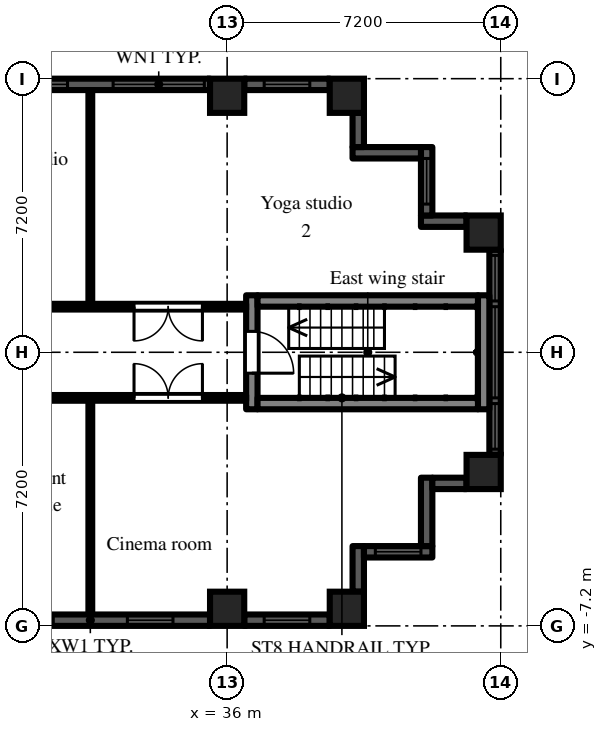
"""IFC4 building model, lengths in metres.
Left out: names, types, materials, properties, quantities, classifications, styles, units other than length and angle.
Written with IfcOpenShell. Run it as: python <this file> out.ifc"""

import sys

from ifc_helpers import new_model, si_unit, direction, frame, frame_2d, origin, origin_2d, place, context, subcontext, project, spatial, rectangle, extrude, element, fill, save


model = new_model("IFC4")
c1 = context("Model", 3, precision=1e-05, world=origin(), true_north=direction((0.0, 1.0)))
c2 = subcontext(c1, "Body", "Model", "MODEL_VIEW")
j1 = project(units=[si_unit("LENGTHUNIT", "METRE"), si_unit("PLANEANGLEUNIT", "RADIAN")], contexts=[c1])
p1 = place(None, origin())
s1 = spatial("IfcSite", under=j1, at=p1, CompositionType="ELEMENT")
p2 = place(p1, origin())
s2 = spatial("IfcBuilding", under=s1, at=p2, CompositionType="ELEMENT")
p3 = place(p2, frame((0.0, 0.0, 102.9)))
s3 = spatial("IfcBuildingStorey", under=s2, at=p3, CompositionType="ELEMENT", Elevation=102.9)
for number, where, z_axis, x_axis in (
    (1, (36.0, -6.75, 0.0), (0.0, 0.0, 1.0), (1.0, 0.0, 0.0)),
    (2, (36.0, 6.75, 0.0), (0.0, 0.0, 1.0), (1.0, 0.0, 0.0)),
    (3, (39.15, -6.75, 0.0), (0.0, 0.0, 1.0), (1.0, 0.0, 0.0)),
    (4, (39.15, 6.75, 0.0), (0.0, 0.0, 1.0), (1.0, 0.0, 0.0)),
    (5, (42.75, -3.15, 0.0), (0.0, 0.0, 1.0), (1.0, 0.0, 0.0)),
    (6, (42.75, 3.15, 0.0), (0.0, 0.0, 1.0), (1.0, 0.0, 0.0)),
):
    element("IfcColumn", number, at=place(p3, frame(where, z_axis=z_axis, x_axis=x_axis)), inside=s3, PredefinedType="COLUMN", context=c2, shape_type="SweptSolid", body=[
        extrude(rectangle(XDim=0.9, YDim=0.9, at=origin_2d()), origin(), (0.0, 0.0, 1.0), 3.0),
    ])
p4 = place(p3, frame((29.25, -7.05, 0.0), z_axis=(0.0, 0.0, 1.0), x_axis=(1.0, 0.0, 0.0)))
e7 = element("IfcWall", 7, at=p4, inside=s3, PredefinedType="SOLIDWALL", context=c2, shape_type="SweptSolid", body=[
    extrude(rectangle(XDim=6.3, YDim=0.3, at=frame_2d((3.15, 0.0))), origin(), (0.0, 0.0, 1.0), 2.1),
])
p5 = place(p4, frame((0.975, 0.0, 0.2)))
e8 = element("IfcOpeningElement", 8, at=p5, cuts=e7, PredefinedType="OPENING", context=c2, shape_type="SweptSolid", body=[
    extrude(rectangle(XDim=1.2, YDim=1.85, at=frame_2d((0.6, 0.925))), frame((0.0, 0.16, 0.0), z_axis=(0.0, -1.0, 0.0), x_axis=(1.0, 0.0, 0.0)), (0.0, 0.0, 1.0), 0.32),
])
p6 = place(p4, frame((4.125, 0.0, 0.2)))
e9 = element("IfcOpeningElement", 9, at=p6, cuts=e7, PredefinedType="OPENING", context=c2, shape_type="SweptSolid", body=[
    extrude(rectangle(XDim=1.2, YDim=1.85, at=frame_2d((0.6, 0.925))), frame((0.0, 0.16, 0.0), z_axis=(0.0, -1.0, 0.0), x_axis=(1.0, 0.0, 0.0)), (0.0, 0.0, 1.0), 0.32),
])
p7 = place(p3, frame((36.45, -7.05, 0.0), z_axis=(0.0, 0.0, 1.0), x_axis=(1.0, 0.0, 0.0)))
e10 = element("IfcWall", 10, at=p7, inside=s3, PredefinedType="SOLIDWALL", context=c2, shape_type="SweptSolid", body=[
    extrude(rectangle(XDim=2.25, YDim=0.3, at=frame_2d((1.125, 0.0))), origin(), (0.0, 0.0, 1.0), 2.1),
])
p8 = place(p7, frame((0.525, 0.0, 0.2)))
e11 = element("IfcOpeningElement", 11, at=p8, cuts=e10, PredefinedType="OPENING", context=c2, shape_type="SweptSolid", body=[
    extrude(rectangle(XDim=1.2, YDim=1.85, at=frame_2d((0.6, 0.925))), frame((0.0, 0.16, 0.0), z_axis=(0.0, -1.0, 0.0), x_axis=(1.0, 0.0, 0.0)), (0.0, 0.0, 1.0), 0.32),
])
p9 = place(p3, frame((39.45, -6.3, 0.0), z_axis=(0.0, 0.0, 1.0), x_axis=(0.0, 1.0, 0.0)))
e12 = element("IfcWall", 12, at=p9, inside=s3, PredefinedType="SOLIDWALL", context=c2, shape_type="SweptSolid", body=[
    extrude(rectangle(XDim=1.2, YDim=0.3, at=frame_2d((0.6, 0.0))), origin(), (0.0, 0.0, 1.0), 2.575),
])
p10 = place(p3, frame((39.6, -5.25, 0.0), z_axis=(0.0, 0.0, 1.0), x_axis=(1.0, 0.0, 0.0)))
e13 = element("IfcWall", 13, at=p10, inside=s3, PredefinedType="SOLIDWALL", context=c2, shape_type="SweptSolid", body=[
    extrude(rectangle(XDim=1.8, YDim=0.3, at=frame_2d((0.9, 0.0))), origin(), (0.0, 0.0, 1.0), 2.575),
])
p11 = place(p10, frame((0.3, 0.0, 0.2)))
e14 = element("IfcOpeningElement", 14, at=p11, cuts=e13, PredefinedType="OPENING", context=c2, shape_type="SweptSolid", body=[
    extrude(rectangle(XDim=1.2, YDim=1.85, at=frame_2d((0.6, 0.925))), frame((0.0, 0.16, 0.0), z_axis=(0.0, -1.0, 0.0), x_axis=(1.0, 0.0, 0.0)), (0.0, 0.0, 1.0), 0.32),
])
p12 = place(p3, frame((41.25, -5.1, 0.0), z_axis=(0.0, 0.0, 1.0), x_axis=(0.0, 1.0, 0.0)))
e15 = element("IfcWall", 15, at=p12, inside=s3, PredefinedType="SOLIDWALL", context=c2, shape_type="SweptSolid", body=[
    extrude(rectangle(XDim=1.8, YDim=0.3, at=frame_2d((0.9, 0.0))), origin(), (0.0, 0.0, 1.0), 2.575),
])
p13 = place(p3, frame((41.4, -3.45, 0.0), z_axis=(0.0, 0.0, 1.0), x_axis=(1.0, 0.0, 0.0)))
e16 = element("IfcWall", 16, at=p13, inside=s3, PredefinedType="SOLIDWALL", context=c2, shape_type="SweptSolid", body=[
    extrude(rectangle(XDim=0.9, YDim=0.3, at=frame_2d((0.45, 0.0))), origin(), (0.0, 0.0, 1.0), 2.575),
])
p14 = place(p3, frame((43.05, -2.7, 0.0), z_axis=(0.0, 0.0, 1.0), x_axis=(0.0, 1.0, 0.0)))
e17 = element("IfcWall", 17, at=p14, inside=s3, PredefinedType="SOLIDWALL", context=c2, shape_type="SweptSolid", body=[
    extrude(rectangle(XDim=5.4, YDim=0.3, at=frame_2d((2.7, 0.0))), origin(), (0.0, 0.0, 1.0), 2.1),
])
p15 = place(p14, frame((1.5, 0.0, 0.2)))
e18 = element("IfcOpeningElement", 18, at=p15, cuts=e17, PredefinedType="OPENING", context=c2, shape_type="SweptSolid", body=[
    extrude(rectangle(XDim=2.4, YDim=1.85, at=frame_2d((1.2, 0.925))), frame((0.0, 0.16, 0.0), z_axis=(0.0, -1.0, 0.0), x_axis=(1.0, 0.0, 0.0)), (0.0, 0.0, 1.0), 0.32),
])
p16 = place(p14, frame((0.15, 0.0, 0.2)))
e19 = element("IfcOpeningElement", 19, at=p16, cuts=e17, PredefinedType="OPENING", context=c2, shape_type="SweptSolid", body=[
    extrude(rectangle(XDim=1.2, YDim=1.85, at=frame_2d((0.6, 0.925))), frame((0.0, 0.16, 0.0), z_axis=(0.0, -1.0, 0.0), x_axis=(1.0, 0.0, 0.0)), (0.0, 0.0, 1.0), 0.32),
])
p17 = place(p14, frame((4.05, 0.0, 0.2)))
e20 = element("IfcOpeningElement", 20, at=p17, cuts=e17, PredefinedType="OPENING", context=c2, shape_type="SweptSolid", body=[
    extrude(rectangle(XDim=1.2, YDim=1.85, at=frame_2d((0.6, 0.925))), frame((0.0, 0.16, 0.0), z_axis=(0.0, -1.0, 0.0), x_axis=(1.0, 0.0, 0.0)), (0.0, 0.0, 1.0), 0.32),
])
p18 = place(p3, frame((42.3, 3.45, 0.0), z_axis=(0.0, 0.0, 1.0), x_axis=(-1.0, 0.0, 0.0)))
e21 = element("IfcWall", 21, at=p18, inside=s3, PredefinedType="SOLIDWALL", context=c2, shape_type="SweptSolid", body=[
    extrude(rectangle(XDim=1.2, YDim=0.3, at=frame_2d((0.6, 0.0))), origin(), (0.0, 0.0, 1.0), 2.575),
])
p19 = place(p3, frame((41.25, 3.6, 0.0), z_axis=(0.0, 0.0, 1.0), x_axis=(0.0, 1.0, 0.0)))
e22 = element("IfcWall", 22, at=p19, inside=s3, PredefinedType="SOLIDWALL", context=c2, shape_type="SweptSolid", body=[
    extrude(rectangle(XDim=1.8, YDim=0.3, at=frame_2d((0.9, 0.0))), origin(), (0.0, 0.0, 1.0), 2.575),
])
p20 = place(p19, frame((0.3, 0.0, 0.2)))
e23 = element("IfcOpeningElement", 23, at=p20, cuts=e22, PredefinedType="OPENING", context=c2, shape_type="SweptSolid", body=[
    extrude(rectangle(XDim=1.2, YDim=1.85, at=frame_2d((0.6, 0.925))), frame((0.0, 0.16, 0.0), z_axis=(0.0, -1.0, 0.0), x_axis=(1.0, 0.0, 0.0)), (0.0, 0.0, 1.0), 0.32),
])
p21 = place(p3, frame((41.1, 5.25, 0.0), z_axis=(0.0, 0.0, 1.0), x_axis=(-1.0, 0.0, 0.0)))
e24 = element("IfcWall", 24, at=p21, inside=s3, PredefinedType="SOLIDWALL", context=c2, shape_type="SweptSolid", body=[
    extrude(rectangle(XDim=1.8, YDim=0.3, at=frame_2d((0.9, 0.0))), origin(), (0.0, 0.0, 1.0), 2.575),
])
p22 = place(p3, frame((39.45, 5.4, 0.0), z_axis=(0.0, 0.0, 1.0), x_axis=(0.0, 1.0, 0.0)))
e25 = element("IfcWall", 25, at=p22, inside=s3, PredefinedType="SOLIDWALL", context=c2, shape_type="SweptSolid", body=[
    extrude(rectangle(XDim=0.9, YDim=0.3, at=frame_2d((0.45, 0.0))), origin(), (0.0, 0.0, 1.0), 2.575),
])
p23 = place(p3, frame((38.7, 7.05, 0.0), z_axis=(0.0, 0.0, 1.0), x_axis=(-1.0, 0.0, 0.0)))
e26 = element("IfcWall", 26, at=p23, inside=s3, PredefinedType="SOLIDWALL", context=c2, shape_type="SweptSolid", body=[
    extrude(rectangle(XDim=2.25, YDim=0.3, at=frame_2d((1.125, 0.0))), origin(), (0.0, 0.0, 1.0), 2.1),
])
p24 = place(p23, frame((0.525, 0.0, 0.2)))
e27 = element("IfcOpeningElement", 27, at=p24, cuts=e26, PredefinedType="OPENING", context=c2, shape_type="SweptSolid", body=[
    extrude(rectangle(XDim=1.2, YDim=1.85, at=frame_2d((0.6, 0.925))), frame((0.0, 0.16, 0.0), z_axis=(0.0, -1.0, 0.0), x_axis=(1.0, 0.0, 0.0)), (0.0, 0.0, 1.0), 0.32),
])
p25 = place(p3, frame((35.55, 7.05, 0.0), z_axis=(0.0, 0.0, 1.0), x_axis=(-1.0, 0.0, 0.0)))
e28 = element("IfcWall", 28, at=p25, inside=s3, PredefinedType="SOLIDWALL", context=c2, shape_type="SweptSolid", body=[
    extrude(rectangle(XDim=6.3, YDim=0.3, at=frame_2d((3.15, 0.0))), origin(), (0.0, 0.0, 1.0), 2.1),
])
p26 = place(p25, frame((0.15, 0.0, 0.2)))
e29 = element("IfcOpeningElement", 29, at=p26, cuts=e28, PredefinedType="OPENING", context=c2, shape_type="SweptSolid", body=[
    extrude(rectangle(XDim=2.4, YDim=1.85, at=frame_2d((1.2, 0.925))), frame((0.0, 0.16, 0.0), z_axis=(0.0, -1.0, 0.0), x_axis=(1.0, 0.0, 0.0)), (0.0, 0.0, 1.0), 0.32),
])
p27 = place(p25, frame((3.75, 0.0, 0.2)))
e30 = element("IfcOpeningElement", 30, at=p27, cuts=e28, PredefinedType="OPENING", context=c2, shape_type="SweptSolid", body=[
    extrude(rectangle(XDim=2.4, YDim=1.85, at=frame_2d((1.2, 0.925))), frame((0.0, 0.16, 0.0), z_axis=(0.0, -1.0, 0.0), x_axis=(1.0, 0.0, 0.0)), (0.0, 0.0, 1.0), 0.32),
])
p28 = place(p3, frame((36.65, -1.5, 0.0), z_axis=(0.0, 0.0, 1.0), x_axis=(0.0, 1.0, 0.0)))
e31 = element("IfcWall", 31, at=p28, inside=s3, PredefinedType="SHEAR", context=c2, shape_type="SweptSolid", body=[
    extrude(rectangle(XDim=3.0, YDim=0.3, at=frame_2d((1.5, 0.0))), origin(), (0.0, 0.0, 1.0), 2.575),
])
p29 = place(p28, frame((0.95, 0.0, 0.0)))
e32 = element("IfcOpeningElement", 32, at=p29, cuts=e31, PredefinedType="OPENING", context=c2, shape_type="SweptSolid", body=[
    extrude(rectangle(XDim=1.1, YDim=2.1, at=frame_2d((0.55, 1.05))), frame((0.0, 0.16, 0.0), z_axis=(0.0, -1.0, 0.0), x_axis=(1.0, 0.0, 0.0)), (0.0, 0.0, 1.0), 0.32),
])
p30 = place(p3, frame((42.75, -1.5, 0.0), z_axis=(0.0, 0.0, 1.0), x_axis=(0.0, 1.0, 0.0)))
e33 = element("IfcWall", 33, at=p30, inside=s3, PredefinedType="SHEAR", context=c2, shape_type="SweptSolid", body=[
    extrude(rectangle(XDim=3.0, YDim=0.3, at=frame_2d((1.5, 0.0))), origin(), (0.0, 0.0, 1.0), 2.575),
])
for number, where, z_axis, x_axis in (
    (34, (36.8, -1.35, 0.0), (0.0, 0.0, 1.0), (1.0, 0.0, 0.0)),
    (35, (36.8, 1.35, 0.0), (0.0, 0.0, 1.0), (1.0, 0.0, 0.0)),
):
    element("IfcWall", number, at=place(p3, frame(where, z_axis=z_axis, x_axis=x_axis)), inside=s3, PredefinedType="SHEAR", context=c2, shape_type="SweptSolid", body=[
        extrude(rectangle(XDim=5.8, YDim=0.3, at=frame_2d((2.9, 0.0))), origin(), (0.0, 0.0, 1.0), 2.575),
    ])
p31 = place(p3, frame((21.6, -1.2, 0.0), z_axis=(0.0, 0.0, 1.0), x_axis=(1.0, 0.0, 0.0)))
e36 = element("IfcWall", 36, at=p31, inside=s3, PredefinedType="PARTITIONING", context=c2, shape_type="SweptSolid", body=[
    extrude(rectangle(XDim=14.9, YDim=0.15, at=frame_2d((7.45, 0.0))), origin(), (0.0, 0.0, 1.0), 2.575),
])
p32 = place(p31, frame((0.2, 0.0, 0.0)))
e37 = element("IfcOpeningElement", 37, at=p32, cuts=e36, PredefinedType="OPENING", context=c2, shape_type="SweptSolid", body=[
    extrude(rectangle(XDim=1.0, YDim=2.1, at=frame_2d((0.5, 1.05))), frame((0.0, 0.085, 0.0), z_axis=(0.0, -1.0, 0.0), x_axis=(1.0, 0.0, 0.0)), (0.0, 0.0, 1.0), 0.17),
])
p33 = place(p31, frame((5.71, 0.0, 0.0)))
e38 = element("IfcOpeningElement", 38, at=p33, cuts=e36, PredefinedType="OPENING", context=c2, shape_type="SweptSolid", body=[
    extrude(rectangle(XDim=1.0, YDim=2.1, at=frame_2d((0.5, 1.05))), frame((0.0, 0.085, 0.0), z_axis=(0.0, -1.0, 0.0), x_axis=(1.0, 0.0, 0.0)), (0.0, 0.0, 1.0), 0.17),
])
p34 = place(p31, frame((11.95, 0.0, 0.0)))
e39 = element("IfcOpeningElement", 39, at=p34, cuts=e36, PredefinedType="OPENING", context=c2, shape_type="SweptSolid", body=[
    extrude(rectangle(XDim=1.8, YDim=2.1, at=frame_2d((0.9, 1.05))), frame((0.0, 0.085, 0.0), z_axis=(0.0, -1.0, 0.0), x_axis=(1.0, 0.0, 0.0)), (0.0, 0.0, 1.0), 0.17),
])
p35 = place(p3, frame((21.6, 1.2, 0.0), z_axis=(0.0, 0.0, 1.0), x_axis=(1.0, 0.0, 0.0)))
e40 = element("IfcWall", 40, at=p35, inside=s3, PredefinedType="PARTITIONING", context=c2, shape_type="SweptSolid", body=[
    extrude(rectangle(XDim=14.9, YDim=0.15, at=frame_2d((7.45, 0.0))), origin(), (0.0, 0.0, 1.0), 2.575),
])
p36 = place(p35, frame((0.45, 0.0, 0.0)))
e41 = element("IfcOpeningElement", 41, at=p36, cuts=e40, PredefinedType="OPENING", context=c2, shape_type="SweptSolid", body=[
    extrude(rectangle(XDim=0.9, YDim=2.1, at=frame_2d((0.45, 1.05))), frame((0.0, 0.085, 0.0), z_axis=(0.0, -1.0, 0.0), x_axis=(1.0, 0.0, 0.0)), (0.0, 0.0, 1.0), 0.17),
])
p37 = place(p35, frame((2.25, 0.0, 0.0)))
e42 = element("IfcOpeningElement", 42, at=p37, cuts=e40, PredefinedType="OPENING", context=c2, shape_type="SweptSolid", body=[
    extrude(rectangle(XDim=0.9, YDim=2.1, at=frame_2d((0.45, 1.05))), frame((0.0, 0.085, 0.0), z_axis=(0.0, -1.0, 0.0), x_axis=(1.0, 0.0, 0.0)), (0.0, 0.0, 1.0), 0.17),
])
p38 = place(p35, frame((6.3, 0.0, 0.0)))
e43 = element("IfcOpeningElement", 43, at=p38, cuts=e40, PredefinedType="OPENING", context=c2, shape_type="SweptSolid", body=[
    extrude(rectangle(XDim=1.8, YDim=2.1, at=frame_2d((0.9, 1.05))), frame((0.0, 0.085, 0.0), z_axis=(0.0, -1.0, 0.0), x_axis=(1.0, 0.0, 0.0)), (0.0, 0.0, 1.0), 0.17),
])
p39 = place(p35, frame((11.95, 0.0, 0.0)))
e44 = element("IfcOpeningElement", 44, at=p39, cuts=e40, PredefinedType="OPENING", context=c2, shape_type="SweptSolid", body=[
    extrude(rectangle(XDim=1.8, YDim=2.1, at=frame_2d((0.9, 1.05))), frame((0.0, 0.085, 0.0), z_axis=(0.0, -1.0, 0.0), x_axis=(1.0, 0.0, 0.0)), (0.0, 0.0, 1.0), 0.17),
])
for number, where, z_axis, x_axis in (
    (45, (32.4, -6.9, 0.0), (0.0, 0.0, 1.0), (0.0, 1.0, 0.0)),
    (46, (32.4, 1.275, 0.0), (0.0, 0.0, 1.0), (0.0, 1.0, 0.0)),
):
    element("IfcWall", number, at=place(p3, frame(where, z_axis=z_axis, x_axis=x_axis)), inside=s3, PredefinedType="PARTITIONING", context=c2, shape_type="SweptSolid", body=[
        extrude(rectangle(XDim=5.625, YDim=0.1, at=frame_2d((2.812, 0.0))), origin(), (0.0, 0.0, 1.0), 2.575),
    ])
p40 = place(p5, origin())
e47 = element("IfcWindow", 47, at=p40, inside=s3, PartitioningType="SINGLE_PANEL", PredefinedType="WINDOW", context=c2, shape_type="SweptSolid", body=[
    extrude(rectangle(XDim=1.2, YDim=1.85, at=frame_2d((0.6, 0.925))), frame((0.0, 0.03, 0.0), z_axis=(0.0, -1.0, 0.0), x_axis=(1.0, 0.0, 0.0)), (0.0, 0.0, 1.0), 0.06),
])
fill(e8, e47)
p41 = place(p6, origin())
e48 = element("IfcWindow", 48, at=p41, inside=s3, PartitioningType="SINGLE_PANEL", PredefinedType="WINDOW", context=c2, shape_type="SweptSolid", body=[
    extrude(rectangle(XDim=1.2, YDim=1.85, at=frame_2d((0.6, 0.925))), frame((0.0, 0.03, 0.0), z_axis=(0.0, -1.0, 0.0), x_axis=(1.0, 0.0, 0.0)), (0.0, 0.0, 1.0), 0.06),
])
fill(e9, e48)
p42 = place(p8, origin())
e49 = element("IfcWindow", 49, at=p42, inside=s3, PartitioningType="SINGLE_PANEL", PredefinedType="WINDOW", context=c2, shape_type="SweptSolid", body=[
    extrude(rectangle(XDim=1.2, YDim=1.85, at=frame_2d((0.6, 0.925))), frame((0.0, 0.03, 0.0), z_axis=(0.0, -1.0, 0.0), x_axis=(1.0, 0.0, 0.0)), (0.0, 0.0, 1.0), 0.06),
])
fill(e11, e49)
p43 = place(p11, origin())
e50 = element("IfcWindow", 50, at=p43, inside=s3, PartitioningType="SINGLE_PANEL", PredefinedType="WINDOW", context=c2, shape_type="SweptSolid", body=[
    extrude(rectangle(XDim=1.2, YDim=1.85, at=frame_2d((0.6, 0.925))), frame((0.0, 0.03, 0.0), z_axis=(0.0, -1.0, 0.0), x_axis=(1.0, 0.0, 0.0)), (0.0, 0.0, 1.0), 0.06),
])
fill(e14, e50)
p44 = place(p15, origin())
e51 = element("IfcWindow", 51, at=p44, inside=s3, PartitioningType="SINGLE_PANEL", PredefinedType="WINDOW", context=c2, shape_type="SweptSolid", body=[
    extrude(rectangle(XDim=2.4, YDim=1.85, at=frame_2d((1.2, 0.925))), frame((0.0, 0.03, 0.0), z_axis=(0.0, -1.0, 0.0), x_axis=(1.0, 0.0, 0.0)), (0.0, 0.0, 1.0), 0.06),
])
fill(e18, e51)
p45 = place(p16, origin())
e52 = element("IfcWindow", 52, at=p45, inside=s3, PartitioningType="SINGLE_PANEL", PredefinedType="WINDOW", context=c2, shape_type="SweptSolid", body=[
    extrude(rectangle(XDim=1.2, YDim=1.85, at=frame_2d((0.6, 0.925))), frame((0.0, 0.03, 0.0), z_axis=(0.0, -1.0, 0.0), x_axis=(1.0, 0.0, 0.0)), (0.0, 0.0, 1.0), 0.06),
])
fill(e19, e52)
p46 = place(p17, origin())
e53 = element("IfcWindow", 53, at=p46, inside=s3, PartitioningType="SINGLE_PANEL", PredefinedType="WINDOW", context=c2, shape_type="SweptSolid", body=[
    extrude(rectangle(XDim=1.2, YDim=1.85, at=frame_2d((0.6, 0.925))), frame((0.0, 0.03, 0.0), z_axis=(0.0, -1.0, 0.0), x_axis=(1.0, 0.0, 0.0)), (0.0, 0.0, 1.0), 0.06),
])
fill(e20, e53)
p47 = place(p20, origin())
e54 = element("IfcWindow", 54, at=p47, inside=s3, PartitioningType="SINGLE_PANEL", PredefinedType="WINDOW", context=c2, shape_type="SweptSolid", body=[
    extrude(rectangle(XDim=1.2, YDim=1.85, at=frame_2d((0.6, 0.925))), frame((0.0, 0.03, 0.0), z_axis=(0.0, -1.0, 0.0), x_axis=(1.0, 0.0, 0.0)), (0.0, 0.0, 1.0), 0.06),
])
fill(e23, e54)
p48 = place(p24, origin())
e55 = element("IfcWindow", 55, at=p48, inside=s3, PartitioningType="SINGLE_PANEL", PredefinedType="WINDOW", context=c2, shape_type="SweptSolid", body=[
    extrude(rectangle(XDim=1.2, YDim=1.85, at=frame_2d((0.6, 0.925))), frame((0.0, 0.03, 0.0), z_axis=(0.0, -1.0, 0.0), x_axis=(1.0, 0.0, 0.0)), (0.0, 0.0, 1.0), 0.06),
])
fill(e27, e55)
p49 = place(p26, origin())
e56 = element("IfcWindow", 56, at=p49, inside=s3, PartitioningType="SINGLE_PANEL", PredefinedType="WINDOW", context=c2, shape_type="SweptSolid", body=[
    extrude(rectangle(XDim=2.4, YDim=1.85, at=frame_2d((1.2, 0.925))), frame((0.0, 0.03, 0.0), z_axis=(0.0, -1.0, 0.0), x_axis=(1.0, 0.0, 0.0)), (0.0, 0.0, 1.0), 0.06),
])
fill(e29, e56)
p50 = place(p27, origin())
e57 = element("IfcWindow", 57, at=p50, inside=s3, PartitioningType="SINGLE_PANEL", PredefinedType="WINDOW", context=c2, shape_type="SweptSolid", body=[
    extrude(rectangle(XDim=2.4, YDim=1.85, at=frame_2d((1.2, 0.925))), frame((0.0, 0.03, 0.0), z_axis=(0.0, -1.0, 0.0), x_axis=(1.0, 0.0, 0.0)), (0.0, 0.0, 1.0), 0.06),
])
fill(e30, e57)
p51 = place(p29, frame((1.1, 0.0, 0.0), z_axis=(0.0, 0.0, 1.0), x_axis=(-1.0, 0.0, 0.0)))
e58 = element("IfcDoor", 58, at=p51, inside=s3, OperationType="SINGLE_SWING_RIGHT", PredefinedType="DOOR", context=c2, shape_type="SweptSolid", body=[
    extrude(rectangle(XDim=1.1, YDim=2.1, at=frame_2d((0.55, 1.05))), frame((0.0, 0.025, 0.0), z_axis=(0.0, -1.0, 0.0), x_axis=(1.0, 0.0, 0.0)), (0.0, 0.0, 1.0), 0.05),
])
fill(e32, e58)
p52 = place(p39, frame((1.8, 0.0, 0.0), z_axis=(0.0, 0.0, 1.0), x_axis=(-1.0, 0.0, 0.0)))
e59 = element("IfcDoor", 59, at=p52, inside=s3, OperationType="DOUBLE_DOOR_DOUBLE_SWING", PredefinedType="DOOR", context=c2, shape_type="SweptSolid", body=[
    extrude(rectangle(XDim=1.8, YDim=2.1, at=frame_2d((0.9, 1.05))), frame((0.0, 0.025, 0.0), z_axis=(0.0, -1.0, 0.0), x_axis=(1.0, 0.0, 0.0)), (0.0, 0.0, 1.0), 0.05),
])
fill(e44, e59)
p53 = place(p34, origin())
e60 = element("IfcDoor", 60, at=p53, inside=s3, OperationType="DOUBLE_DOOR_DOUBLE_SWING", PredefinedType="DOOR", context=c2, shape_type="SweptSolid", body=[
    extrude(rectangle(XDim=1.8, YDim=2.1, at=frame_2d((0.9, 1.05))), frame((0.0, 0.025, 0.0), z_axis=(0.0, -1.0, 0.0), x_axis=(1.0, 0.0, 0.0)), (0.0, 0.0, 1.0), 0.05),
])
fill(e39, e60)
save(model, sys.argv[1])
